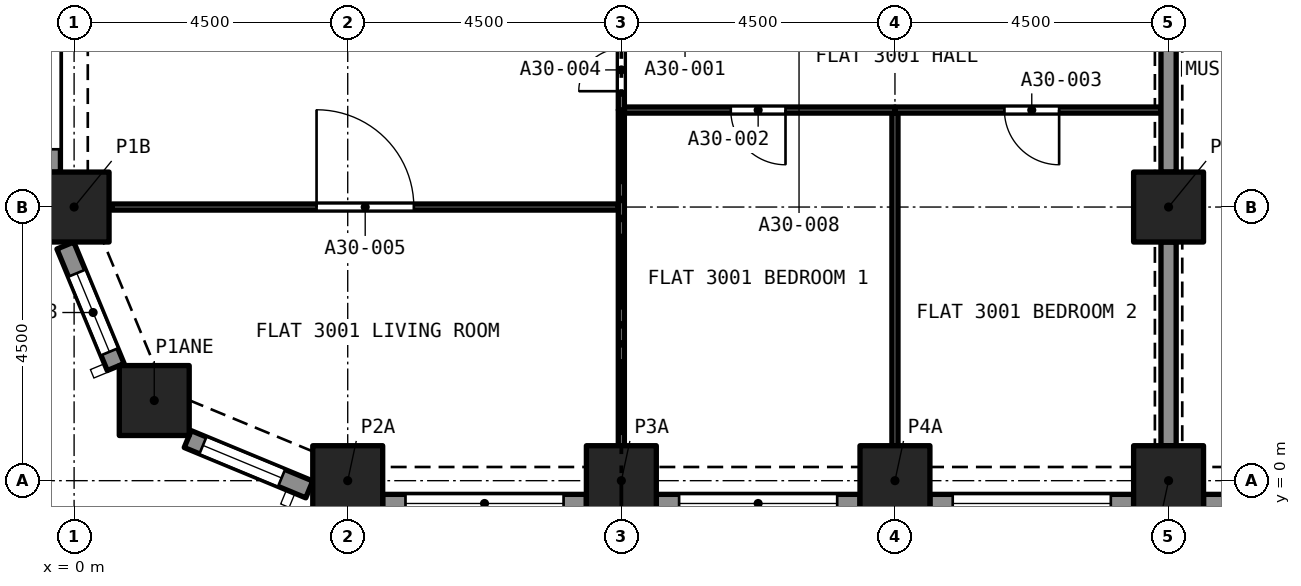
"""IFC4 building model, lengths in metres.
Left out: names, types, materials, properties, quantities, classifications, styles, units other than length and angle.
Written with IfcOpenShell. Run it as: python <this file> out.ifc"""

import sys

from ifc_helpers import new_model, si_unit, direction, frame, frame_2d, origin, origin_2d, place, context, subcontext, project, spatial, rectangle, extrude, element, fill, save


model = new_model("IFC4")
c1 = context("Model", 3, precision=1e-05, world=origin(), true_north=direction((0.0, 1.0)))
c2 = subcontext(c1, "Body", "Model", "MODEL_VIEW")
j1 = project(units=[si_unit("LENGTHUNIT", "METRE"), si_unit("PLANEANGLEUNIT", "RADIAN")], contexts=[c1])
p1 = place(None, origin())
s1 = spatial("IfcSite", under=j1, at=p1, CompositionType="ELEMENT")
p2 = place(p1, origin())
s2 = spatial("IfcBuilding", under=s1, at=p2, CompositionType="ELEMENT")
p3 = place(p2, frame((0.0, 0.0, 108.8)))
s3 = spatial("IfcBuildingStorey", under=s2, at=p3, CompositionType="ELEMENT", Elevation=108.8)
for number, where, z_axis, x_axis in (
    (1, (4.5, 0.0, 0.0), (0.0, 0.0, 1.0), (1.0, 0.0, 0.0)),
    (2, (9.0, 0.0, 0.0), (0.0, 0.0, 1.0), (1.0, 0.0, 0.0)),
    (3, (13.5, 0.0, 0.0), (0.0, 0.0, 1.0), (1.0, 0.0, 0.0)),
    (4, (18.0, 0.0, 0.0), (0.0, 0.0, 1.0), (1.0, 0.0, 0.0)),
    (5, (1.318, 1.318, 0.0), (0.0, 0.0, 1.0), (1.0, 0.0, 0.0)),
    (6, (0.0, 4.5, 0.0), (0.0, 0.0, 1.0), (1.0, 0.0, 0.0)),
    (7, (18.0, 4.5, 0.0), (0.0, 0.0, 1.0), (1.0, 0.0, 0.0)),
):
    element("IfcColumn", number, at=place(p3, frame(where, z_axis=z_axis, x_axis=x_axis)), inside=s3, PredefinedType="COLUMN", context=c2, shape_type="SweptSolid", body=[
        extrude(rectangle(XDim=1.15, YDim=1.15, at=origin_2d()), origin(), (0.0, 0.0, 1.0), 3.2),
    ])
p4 = place(p3, frame((0.684, 1.869, 0.0), z_axis=(0.0, 0.0, 1.0), x_axis=(-0.382723818695, 0.923862802911, 0.0)))
e8 = element("IfcWall", 8, at=p4, inside=s3, PredefinedType="SOLIDWALL", context=c2, shape_type="SweptSolid", body=[
    extrude(rectangle(XDim=2.164, YDim=0.3, at=frame_2d((1.082, 0.0))), origin(), (0.0, 0.0, 1.0), 3.2),
])
p5 = place(p4, frame((0.271, 0.0, 0.45)))
e9 = element("IfcOpeningElement", 9, at=p5, cuts=e8, PredefinedType="OPENING", context=c2, shape_type="SweptSolid", body=[
    extrude(rectangle(XDim=1.4, YDim=1.95, at=frame_2d((0.7, 0.975))), frame((0.0, 0.16, 0.0), z_axis=(0.0, -1.0, 0.0), x_axis=(1.0, 0.0, 0.0)), (0.0, 0.0, 1.0), 0.32),
])
p6 = place(p3, frame((3.868, -0.144, 0.0), z_axis=(0.0, 0.0, 1.0), x_axis=(-0.923862802911, 0.382723818695, 0.0)))
e10 = element("IfcWall", 10, at=p6, inside=s3, PredefinedType="SOLIDWALL", context=c2, shape_type="SweptSolid", body=[
    extrude(rectangle(XDim=2.164, YDim=0.3, at=frame_2d((1.082, 0.0))), origin(), (0.0, 0.0, 1.0), 3.2),
])
p7 = place(p6, frame((0.493, 0.0, 0.45)))
e11 = element("IfcOpeningElement", 11, at=p7, cuts=e10, PredefinedType="OPENING", context=c2, shape_type="SweptSolid", body=[
    extrude(rectangle(XDim=1.4, YDim=1.95, at=frame_2d((0.7, 0.975))), frame((0.0, 0.16, 0.0), z_axis=(0.0, -1.0, 0.0), x_axis=(1.0, 0.0, 0.0)), (0.0, 0.0, 1.0), 0.32),
])
p8 = place(p3, frame((8.425, -0.375, 0.0), z_axis=(0.0, 0.0, 1.0), x_axis=(-1.0, 0.0, 0.0)))
e12 = element("IfcWall", 12, at=p8, inside=s3, PredefinedType="SOLIDWALL", context=c2, shape_type="SweptSolid", body=[
    extrude(rectangle(XDim=3.35, YDim=0.3, at=frame_2d((1.675, 0.0))), origin(), (0.0, 0.0, 1.0), 3.2),
])
p9 = place(p8, frame((0.375, 0.0, 0.45)))
e13 = element("IfcOpeningElement", 13, at=p9, cuts=e12, PredefinedType="OPENING", context=c2, shape_type="SweptSolid", body=[
    extrude(rectangle(XDim=2.6, YDim=1.95, at=frame_2d((1.3, 0.975))), frame((0.0, 0.16, 0.0), z_axis=(0.0, -1.0, 0.0), x_axis=(1.0, 0.0, 0.0)), (0.0, 0.0, 1.0), 0.32),
])
p10 = place(p3, frame((12.925, -0.375, 0.0), z_axis=(0.0, 0.0, 1.0), x_axis=(-1.0, 0.0, 0.0)))
e14 = element("IfcWall", 14, at=p10, inside=s3, PredefinedType="SOLIDWALL", context=c2, shape_type="SweptSolid", body=[
    extrude(rectangle(XDim=3.35, YDim=0.3, at=frame_2d((1.675, 0.0))), origin(), (0.0, 0.0, 1.0), 3.2),
])
p11 = place(p10, frame((0.375, 0.0, 0.45)))
e15 = element("IfcOpeningElement", 15, at=p11, cuts=e14, PredefinedType="OPENING", context=c2, shape_type="SweptSolid", body=[
    extrude(rectangle(XDim=2.6, YDim=1.95, at=frame_2d((1.3, 0.975))), frame((0.0, 0.16, 0.0), z_axis=(0.0, -1.0, 0.0), x_axis=(1.0, 0.0, 0.0)), (0.0, 0.0, 1.0), 0.32),
])
p12 = place(p3, frame((17.425, -0.375, 0.0), z_axis=(0.0, 0.0, 1.0), x_axis=(-1.0, 0.0, 0.0)))
e16 = element("IfcWall", 16, at=p12, inside=s3, PredefinedType="SOLIDWALL", context=c2, shape_type="SweptSolid", body=[
    extrude(rectangle(XDim=3.35, YDim=0.3, at=frame_2d((1.675, 0.0))), origin(), (0.0, 0.0, 1.0), 3.2),
])
p13 = place(p12, frame((0.375, 0.0, 0.45)))
e17 = element("IfcOpeningElement", 17, at=p13, cuts=e16, PredefinedType="OPENING", context=c2, shape_type="SweptSolid", body=[
    extrude(rectangle(XDim=2.6, YDim=1.95, at=frame_2d((1.3, 0.975))), frame((0.0, 0.16, 0.0), z_axis=(0.0, -1.0, 0.0), x_axis=(1.0, 0.0, 0.0)), (0.0, 0.0, 1.0), 0.32),
])
p14 = place(p3, frame((21.925, -0.375, 0.0), z_axis=(0.0, 0.0, 1.0), x_axis=(-1.0, 0.0, 0.0)))
e18 = element("IfcWall", 18, at=p14, inside=s3, PredefinedType="SOLIDWALL", context=c2, shape_type="SweptSolid", body=[
    extrude(rectangle(XDim=3.35, YDim=0.3, at=frame_2d((1.675, 0.0))), origin(), (0.0, 0.0, 1.0), 3.2),
])
p15 = place(p14, frame((0.375, 0.0, 0.45)))
e19 = element("IfcOpeningElement", 19, at=p15, cuts=e18, PredefinedType="OPENING", context=c2, shape_type="SweptSolid", body=[
    extrude(rectangle(XDim=2.6, YDim=1.95, at=frame_2d((1.3, 0.975))), frame((0.0, 0.16, 0.0), z_axis=(0.0, -1.0, 0.0), x_axis=(1.0, 0.0, 0.0)), (0.0, 0.0, 1.0), 0.32),
])
p16 = place(p3, frame((-0.375, 5.075, 0.0), z_axis=(0.0, 0.0, 1.0), x_axis=(0.0, 1.0, 0.0)))
e20 = element("IfcWall", 20, at=p16, inside=s3, PredefinedType="SOLIDWALL", context=c2, shape_type="SweptSolid", body=[
    extrude(rectangle(XDim=3.35, YDim=0.3, at=frame_2d((1.675, 0.0))), origin(), (0.0, 0.0, 1.0), 3.2),
])
p17 = place(p16, frame((0.375, 0.0, 0.45)))
e21 = element("IfcOpeningElement", 21, at=p17, cuts=e20, PredefinedType="OPENING", context=c2, shape_type="SweptSolid", body=[
    extrude(rectangle(XDim=2.6, YDim=1.95, at=frame_2d((1.3, 0.975))), frame((0.0, 0.16, 0.0), z_axis=(0.0, -1.0, 0.0), x_axis=(1.0, 0.0, 0.0)), (0.0, 0.0, 1.0), 0.32),
])
p18 = place(p3, frame((13.5, 0.575, 0.0), z_axis=(0.0, 0.0, 1.0), x_axis=(0.0, 1.0, 0.0)))
e22 = element("IfcWall", 22, at=p18, inside=s3, PredefinedType="PARTITIONING", context=c2, shape_type="SweptSolid", body=[
    extrude(rectangle(XDim=5.47, YDim=0.1, at=frame_2d((2.735, 0.0))), origin(), (0.0, 0.0, 1.0), 2.9),
])
p19 = place(p3, frame((13.5, 6.095, 0.0), z_axis=(0.0, 0.0, 1.0), x_axis=(-1.0, 0.0, 0.0)))
e23 = element("IfcWall", 23, at=p19, inside=s3, PredefinedType="PARTITIONING", context=c2, shape_type="SweptSolid", body=[
    extrude(rectangle(XDim=4.45, YDim=0.1, at=frame_2d((2.225, 0.0))), origin(), (0.0, 0.0, 1.0), 2.9),
])
p20 = place(p19, frame((1.8, 0.0, 0.0)))
e24 = element("IfcOpeningElement", 24, at=p20, cuts=e23, PredefinedType="OPENING", context=c2, shape_type="SweptSolid", body=[
    extrude(rectangle(XDim=0.9, YDim=2.1, at=frame_2d((0.45, 1.05))), frame((0.0, 0.06, 0.0), z_axis=(0.0, -1.0, 0.0), x_axis=(1.0, 0.0, 0.0)), (0.0, 0.0, 1.0), 0.12),
])
p21 = place(p3, frame((9.0, 0.575, 0.0), z_axis=(0.0, 0.0, 1.0), x_axis=(0.0, 1.0, 0.0)))
e25 = element("IfcWall", 25, at=p21, inside=s3, PredefinedType="PARTITIONING", context=c2, shape_type="SweptSolid", body=[
    extrude(rectangle(XDim=5.52, YDim=0.1, at=frame_2d((2.76, 0.0))), origin(), (0.0, 0.0, 1.0), 2.9),
])
p22 = place(p3, frame((17.875, 6.095, 0.0), z_axis=(0.0, 0.0, 1.0), x_axis=(-1.0, 0.0, 0.0)))
e26 = element("IfcWall", 26, at=p22, inside=s3, PredefinedType="PARTITIONING", context=c2, shape_type="SweptSolid", body=[
    extrude(rectangle(XDim=4.375, YDim=0.1, at=frame_2d((2.188, 0.0))), origin(), (0.0, 0.0, 1.0), 2.9),
])
p23 = place(p22, frame((1.675, 0.0, 0.0)))
e27 = element("IfcOpeningElement", 27, at=p23, cuts=e26, PredefinedType="OPENING", context=c2, shape_type="SweptSolid", body=[
    extrude(rectangle(XDim=0.9, YDim=2.1, at=frame_2d((0.45, 1.05))), frame((0.0, 0.06, 0.0), z_axis=(0.0, -1.0, 0.0), x_axis=(1.0, 0.0, 0.0)), (0.0, 0.0, 1.0), 0.12),
])
for number, where, z_axis, x_axis in (
    (28, (18.0, 5.075, 0.0), (0.0, 0.0, 1.0), (0.0, 1.0, 0.0)),
    (29, (18.0, 0.575, 0.0), (0.0, 0.0, 1.0), (0.0, 1.0, 0.0)),
):
    element("IfcWall", number, at=place(p3, frame(where, z_axis=z_axis, x_axis=x_axis)), inside=s3, PredefinedType="PARTITIONING", context=c2, shape_type="SweptSolid", body=[
        extrude(rectangle(XDim=3.35, YDim=0.25, at=frame_2d((1.675, 0.0))), origin(), (0.0, 0.0, 1.0), 2.38),
    ])
p24 = place(p3, frame((9.0, 6.095, 0.0), z_axis=(0.0, 0.0, 1.0), x_axis=(0.0, 1.0, 0.0)))
e30 = element("IfcWall", 30, at=p24, inside=s3, PredefinedType="PARTITIONING", context=c2, shape_type="SweptSolid", body=[
    extrude(rectangle(XDim=1.34, YDim=0.1, at=frame_2d((0.67, 0.0))), origin(), (0.0, 0.0, 1.0), 2.9),
])
p25 = place(p24, frame((0.31, 0.0, 0.0)))
e31 = element("IfcOpeningElement", 31, at=p25, cuts=e30, PredefinedType="OPENING", context=c2, shape_type="SweptSolid", body=[
    extrude(rectangle(XDim=0.7, YDim=2.1, at=frame_2d((0.35, 1.05))), frame((0.0, 0.06, 0.0), z_axis=(0.0, -1.0, 0.0), x_axis=(1.0, 0.0, 0.0)), (0.0, 0.0, 1.0), 0.12),
])
p26 = place(p3, frame((0.622, 4.5, 0.0), z_axis=(0.0, 0.0, 1.0), x_axis=(1.0, 0.0, 0.0)))
e32 = element("IfcWall", 32, at=p26, inside=s3, PredefinedType="PARTITIONING", context=c2, shape_type="SweptSolid", body=[
    extrude(rectangle(XDim=8.328, YDim=0.1, at=frame_2d((4.164, 0.0))), origin(), (0.0, 0.0, 1.0), 2.9),
])
p27 = place(p26, frame((3.365, 0.0, 0.0)))
e33 = element("IfcOpeningElement", 33, at=p27, cuts=e32, PredefinedType="OPENING", context=c2, shape_type="SweptSolid", body=[
    extrude(rectangle(XDim=1.6, YDim=2.1, at=frame_2d((0.8, 1.05))), frame((0.0, 0.06, 0.0), z_axis=(0.0, -1.0, 0.0), x_axis=(1.0, 0.0, 0.0)), (0.0, 0.0, 1.0), 0.12),
])
p28 = place(p5, origin())
e34 = element("IfcWindow", 34, at=p28, inside=s3, PartitioningType="SINGLE_PANEL", PredefinedType="WINDOW", context=c2, shape_type="SweptSolid", body=[
    extrude(rectangle(XDim=1.4, YDim=1.95, at=frame_2d((0.7, 0.975))), frame((0.0, 0.03, 0.0), z_axis=(0.0, -1.0, 0.0), x_axis=(1.0, 0.0, 0.0)), (0.0, 0.0, 1.0), 0.06),
])
fill(e9, e34)
p29 = place(p7, origin())
e35 = element("IfcWindow", 35, at=p29, inside=s3, PartitioningType="SINGLE_PANEL", PredefinedType="WINDOW", context=c2, shape_type="SweptSolid", body=[
    extrude(rectangle(XDim=1.4, YDim=1.95, at=frame_2d((0.7, 0.975))), frame((0.0, 0.03, 0.0), z_axis=(0.0, -1.0, 0.0), x_axis=(1.0, 0.0, 0.0)), (0.0, 0.0, 1.0), 0.06),
])
fill(e11, e35)
p30 = place(p9, origin())
e36 = element("IfcWindow", 36, at=p30, inside=s3, PartitioningType="SINGLE_PANEL", PredefinedType="WINDOW", context=c2, shape_type="SweptSolid", body=[
    extrude(rectangle(XDim=2.6, YDim=1.95, at=frame_2d((1.3, 0.975))), frame((0.0, 0.03, 0.0), z_axis=(0.0, -1.0, 0.0), x_axis=(1.0, 0.0, 0.0)), (0.0, 0.0, 1.0), 0.06),
])
fill(e13, e36)
p31 = place(p11, origin())
e37 = element("IfcWindow", 37, at=p31, inside=s3, PartitioningType="SINGLE_PANEL", PredefinedType="WINDOW", context=c2, shape_type="SweptSolid", body=[
    extrude(rectangle(XDim=2.6, YDim=1.95, at=frame_2d((1.3, 0.975))), frame((0.0, 0.03, 0.0), z_axis=(0.0, -1.0, 0.0), x_axis=(1.0, 0.0, 0.0)), (0.0, 0.0, 1.0), 0.06),
])
fill(e15, e37)
p32 = place(p13, origin())
e38 = element("IfcWindow", 38, at=p32, inside=s3, PartitioningType="SINGLE_PANEL", PredefinedType="WINDOW", context=c2, shape_type="SweptSolid", body=[
    extrude(rectangle(XDim=2.6, YDim=1.95, at=frame_2d((1.3, 0.975))), frame((0.0, 0.03, 0.0), z_axis=(0.0, -1.0, 0.0), x_axis=(1.0, 0.0, 0.0)), (0.0, 0.0, 1.0), 0.06),
])
fill(e17, e38)
p33 = place(p17, origin())
e39 = element("IfcWindow", 39, at=p33, inside=s3, PartitioningType="SINGLE_PANEL", PredefinedType="WINDOW", context=c2, shape_type="SweptSolid", body=[
    extrude(rectangle(XDim=2.6, YDim=1.95, at=frame_2d((1.3, 0.975))), frame((0.0, 0.03, 0.0), z_axis=(0.0, -1.0, 0.0), x_axis=(1.0, 0.0, 0.0)), (0.0, 0.0, 1.0), 0.06),
])
fill(e21, e39)
p34 = place(p20, origin())
e40 = element("IfcDoor", 40, at=p34, inside=s3, OperationType="SINGLE_SWING_RIGHT", PredefinedType="DOOR", context=c2, shape_type="SweptSolid", body=[
    extrude(rectangle(XDim=0.9, YDim=2.1, at=frame_2d((0.45, 1.05))), frame((0.0, 0.025, 0.0), z_axis=(0.0, -1.0, 0.0), x_axis=(1.0, 0.0, 0.0)), (0.0, 0.0, 1.0), 0.05),
])
fill(e24, e40)
p35 = place(p23, origin())
e41 = element("IfcDoor", 41, at=p35, inside=s3, OperationType="SINGLE_SWING_LEFT", PredefinedType="DOOR", context=c2, shape_type="SweptSolid", body=[
    extrude(rectangle(XDim=0.9, YDim=2.1, at=frame_2d((0.45, 1.05))), frame((0.0, 0.025, 0.0), z_axis=(0.0, -1.0, 0.0), x_axis=(1.0, 0.0, 0.0)), (0.0, 0.0, 1.0), 0.05),
])
fill(e27, e41)
p36 = place(p25, origin())
e42 = element("IfcDoor", 42, at=p36, inside=s3, OperationType="SINGLE_SWING_LEFT", PredefinedType="DOOR", context=c2, shape_type="SweptSolid", body=[
    extrude(rectangle(XDim=0.7, YDim=2.1, at=frame_2d((0.35, 1.05))), frame((0.0, 0.025, 0.0), z_axis=(0.0, -1.0, 0.0), x_axis=(1.0, 0.0, 0.0)), (0.0, 0.0, 1.0), 0.05),
])
fill(e31, e42)
p37 = place(p27, origin())
e43 = element("IfcDoor", 43, at=p37, inside=s3, OperationType="SINGLE_SWING_RIGHT", PredefinedType="DOOR", context=c2, shape_type="SweptSolid", body=[
    extrude(rectangle(XDim=1.6, YDim=2.1, at=frame_2d((0.8, 1.05))), frame((0.0, 0.025, 0.0), z_axis=(0.0, -1.0, 0.0), x_axis=(1.0, 0.0, 0.0)), (0.0, 0.0, 1.0), 0.05),
])
fill(e33, e43)
save(model, sys.argv[1])
